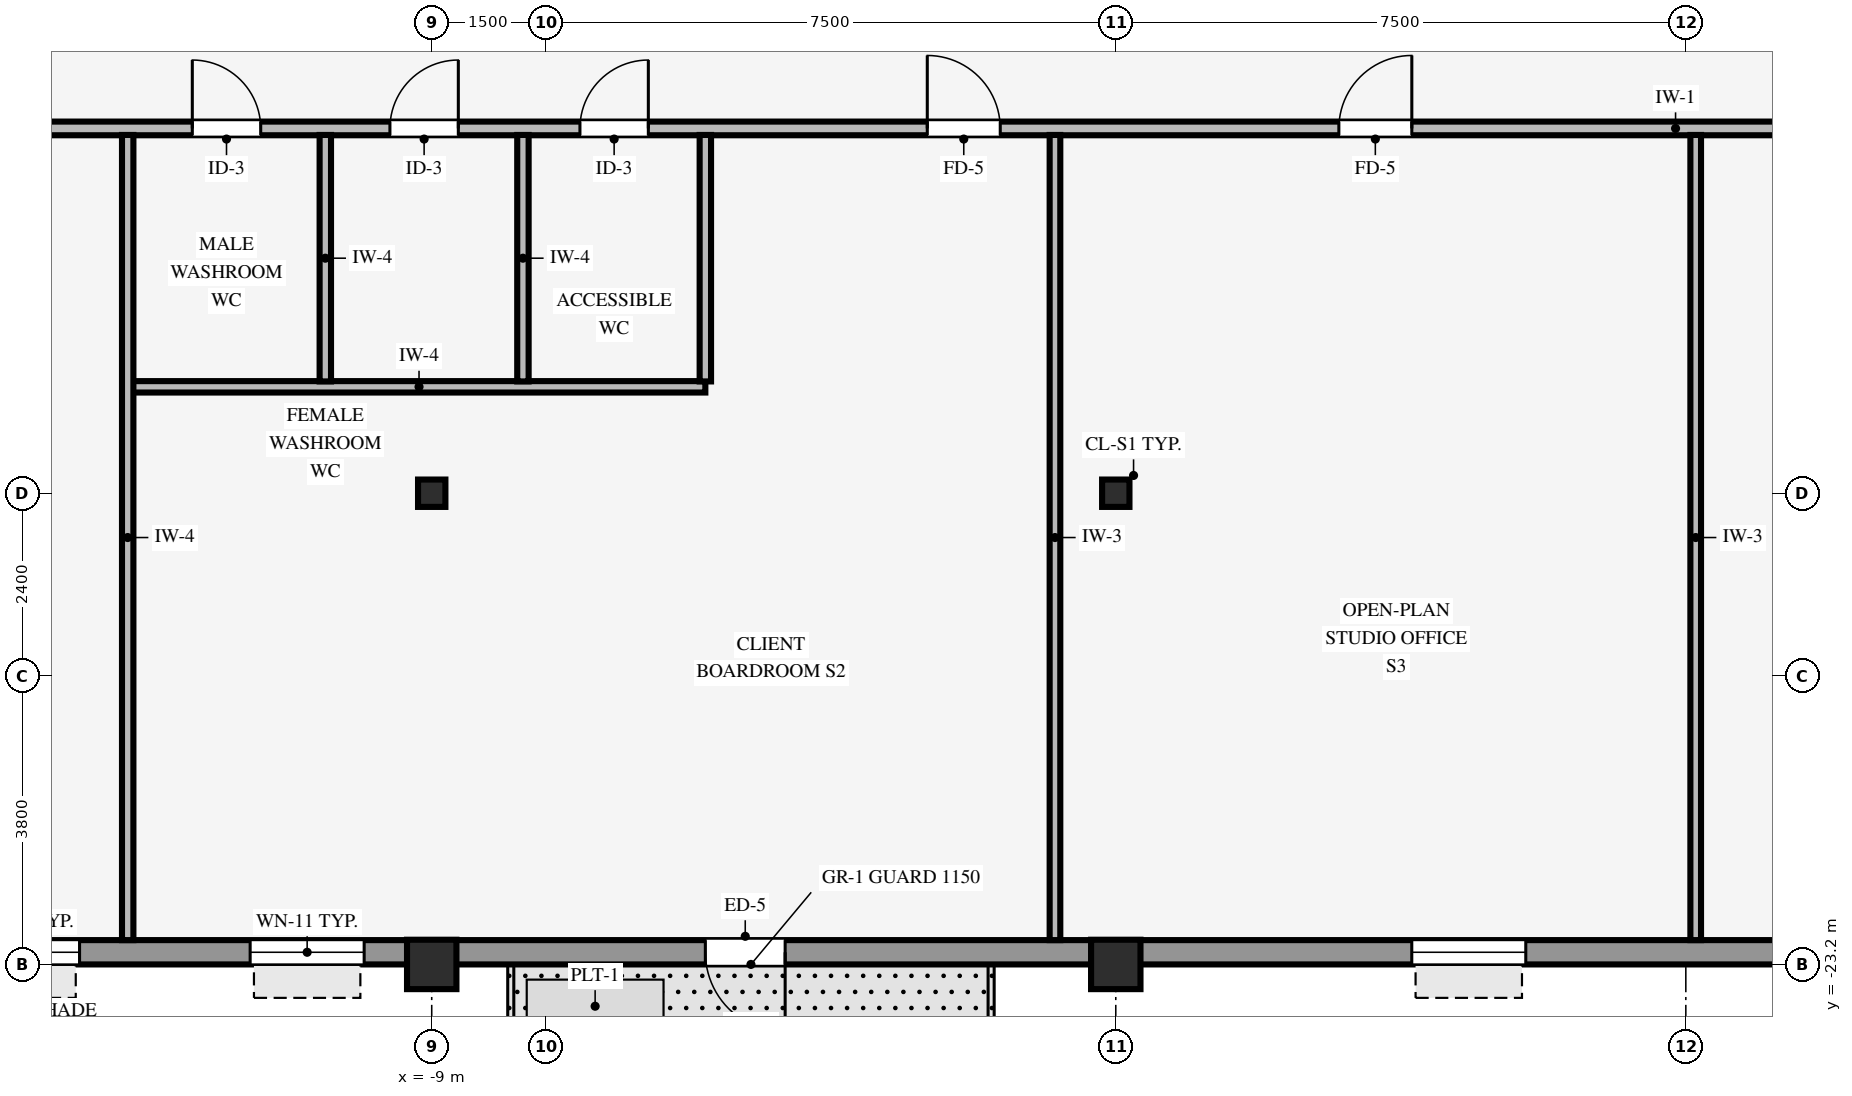
"""IFC4 building model, lengths in metres.
Left out: names, types, materials, properties, quantities, classifications, styles, units other than length and angle.
Written with IfcOpenShell. Run it as: python <this file> out.ifc"""

import sys

from ifc_helpers import new_model, si_unit, direction, frame, frame_2d, origin, origin_2d, place, context, subcontext, project, spatial, rectangle, hollow_rectangle, i_section, extrude, source, transform, mapped, element, fill, save


model = new_model("IFC4")
c1 = context("Model", 3, precision=1e-05, world=origin(), true_north=direction((0.0, 1.0)))
c2 = subcontext(c1, "Body", "Model", "MODEL_VIEW")
j1 = project(units=[si_unit("LENGTHUNIT", "METRE"), si_unit("PLANEANGLEUNIT", "RADIAN")], contexts=[c1])
p1 = place(None, origin())
s1 = spatial("IfcSite", under=j1, at=p1, CompositionType="ELEMENT")
p2 = place(p1, origin())
s2 = spatial("IfcBuilding", under=s1, at=p2, CompositionType="ELEMENT")
p3 = place(p2, frame((0.0, 0.0, 112.9)))
s3 = spatial("IfcBuildingStorey", under=s2, at=p3, CompositionType="ELEMENT", Elevation=112.9)
for number, where, z_axis, x_axis in (
    (1, (-9.0, -23.2, 0.0), (0.0, 0.0, 1.0), (1.0, 0.0, 0.0)),
    (2, (0.0, -23.2, 0.0), (0.0, 0.0, 1.0), (1.0, 0.0, 0.0)),
):
    element("IfcColumn", number, at=place(p3, frame(where, z_axis=z_axis, x_axis=x_axis)), inside=s3, PredefinedType="COLUMN", context=c2, shape_type="SweptSolid", body=[
        extrude(hollow_rectangle(XDim=0.65, YDim=0.65, WallThickness=0.04, InnerFilletRadius=0.04, OuterFilletRadius=0.08, at=origin_2d()), origin(), (0.0, 0.0, 1.0), 3.25),
    ])
for number, where, z_axis, x_axis in (
    (3, (0.0, -17.0, 0.0), (0.0, 0.0, 1.0), (1.0, 0.0, 0.0)),
    (4, (-9.0, -17.0, 0.0), (0.0, 0.0, 1.0), (1.0, 0.0, 0.0)),
):
    element("IfcColumn", number, at=place(p3, frame(where, z_axis=z_axis, x_axis=x_axis)), inside=s3, PredefinedType="COLUMN", context=c2, shape_type="SweptSolid", body=[
        extrude(i_section(OverallWidth=0.36, OverallDepth=0.36, WebThickness=0.021, FlangeThickness=0.021, FilletRadius=0.018, at=origin_2d()), origin(), (0.0, 0.0, 1.0), 3.25),
    ])
p4 = place(p3, frame((-21.9, -23.04, 0.0), z_axis=(0.0, 0.0, 1.0), x_axis=(1.0, 0.0, 0.0)))
e5 = element("IfcWall", 5, at=p4, inside=s3, PredefinedType="STANDARD", context=c2, shape_type="SweptSolid", body=[
    extrude(rectangle(XDim=43.8, YDim=0.32, at=frame_2d((21.9, 0.0))), origin(), (0.0, 0.0, 1.0), 2.585),
])
p5 = place(p4, frame((17.55, 0.0, 0.0), z_axis=(0.0, 0.0, 1.0), x_axis=(-1.0, 0.0, 0.0)))
e6 = element("IfcOpeningElement", 6, at=p5, cuts=e5, PredefinedType="OPENING", context=c2, shape_type="SweptSolid", body=[
    extrude(rectangle(XDim=1.05, YDim=2.1, at=frame_2d((0.525, 1.05))), frame((0.0, 0.17, 0.0), z_axis=(0.0, -1.0, 0.0), x_axis=(1.0, 0.0, 0.0)), (0.0, 0.0, 1.0), 0.34),
])
p6 = place(p4, frame((2.572, 0.0, 0.8)))
e7 = element("IfcOpeningElement", 7, at=p6, cuts=e5, PredefinedType="OPENING", context=c2, shape_type="SweptSolid", body=[
    extrude(rectangle(XDim=1.5, YDim=1.6, at=frame_2d((0.75, 0.8))), frame((0.0, 0.17, 0.0), z_axis=(0.0, -1.0, 0.0), x_axis=(1.0, 0.0, 0.0)), (0.0, 0.0, 1.0), 0.34),
])
p7 = place(p4, frame((6.767, 0.0, 0.8)))
e8 = element("IfcOpeningElement", 8, at=p7, cuts=e5, PredefinedType="OPENING", context=c2, shape_type="SweptSolid", body=[
    extrude(rectangle(XDim=1.5, YDim=1.6, at=frame_2d((0.75, 0.8))), frame((0.0, 0.17, 0.0), z_axis=(0.0, -1.0, 0.0), x_axis=(1.0, 0.0, 0.0)), (0.0, 0.0, 1.0), 0.34),
])
p8 = place(p4, frame((10.511, 0.0, 0.8)))
e9 = element("IfcOpeningElement", 9, at=p8, cuts=e5, PredefinedType="OPENING", context=c2, shape_type="SweptSolid", body=[
    extrude(rectangle(XDim=1.5, YDim=1.6, at=frame_2d((0.75, 0.8))), frame((0.0, 0.17, 0.0), z_axis=(0.0, -1.0, 0.0), x_axis=(1.0, 0.0, 0.0)), (0.0, 0.0, 1.0), 0.34),
])
p9 = place(p4, frame((25.794, 0.0, 0.8)))
e10 = element("IfcOpeningElement", 10, at=p9, cuts=e5, PredefinedType="OPENING", context=c2, shape_type="SweptSolid", body=[
    extrude(rectangle(XDim=1.5, YDim=1.6, at=frame_2d((0.75, 0.8))), frame((0.0, 0.17, 0.0), z_axis=(0.0, -1.0, 0.0), x_axis=(1.0, 0.0, 0.0)), (0.0, 0.0, 1.0), 0.34),
])
p10 = place(p4, frame((31.789, 0.0, 0.8)))
e11 = element("IfcOpeningElement", 11, at=p10, cuts=e5, PredefinedType="OPENING", context=c2, shape_type="SweptSolid", body=[
    extrude(rectangle(XDim=1.5, YDim=1.6, at=frame_2d((0.75, 0.8))), frame((0.0, 0.17, 0.0), z_axis=(0.0, -1.0, 0.0), x_axis=(1.0, 0.0, 0.0)), (0.0, 0.0, 1.0), 0.34),
])
p11 = place(p4, frame((35.083, 0.0, 0.8)))
e12 = element("IfcOpeningElement", 12, at=p11, cuts=e5, PredefinedType="OPENING", context=c2, shape_type="SweptSolid", body=[
    extrude(rectangle(XDim=1.5, YDim=1.6, at=frame_2d((0.75, 0.8))), frame((0.0, 0.17, 0.0), z_axis=(0.0, -1.0, 0.0), x_axis=(1.0, 0.0, 0.0)), (0.0, 0.0, 1.0), 0.34),
])
p12 = place(p4, frame((39.728, 0.0, 0.8)))
e13 = element("IfcOpeningElement", 13, at=p12, cuts=e5, PredefinedType="OPENING", context=c2, shape_type="SweptSolid", body=[
    extrude(rectangle(XDim=1.5, YDim=1.6, at=frame_2d((0.75, 0.8))), frame((0.0, 0.17, 0.0), z_axis=(0.0, -1.0, 0.0), x_axis=(1.0, 0.0, 0.0)), (0.0, 0.0, 1.0), 0.34),
])
p13 = place(p3, frame((-12.934, -15.6, 0.0), z_axis=(0.0, 0.0, 1.0), x_axis=(1.0, 0.0, 0.0)))
e14 = element("IfcWall", 14, at=p13, inside=s3, PredefinedType="PARTITIONING", context=c2, shape_type="SweptSolid", body=[
    extrude(rectangle(XDim=7.534, YDim=0.15, at=frame_2d((3.767, 0.0))), origin(), (0.0, 0.0, 1.0), 3.24),
])
p14 = place(p3, frame((-15.0, -12.2, 0.0), z_axis=(0.0, 0.0, 1.0), x_axis=(1.0, 0.0, 0.0)))
e15 = element("IfcWall", 15, at=p14, inside=s3, PredefinedType="PARTITIONING", context=c2, shape_type="SweptSolid", body=[
    extrude(rectangle(XDim=30.0, YDim=0.18, at=frame_2d((15.0, 0.0))), origin(), (0.0, 0.0, 1.0), 3.24),
])
p15 = place(p14, frame((17.935, 0.0, 0.0)))
e16 = element("IfcOpeningElement", 16, at=p15, cuts=e15, PredefinedType="OPENING", context=c2, shape_type="SweptSolid", body=[
    extrude(rectangle(XDim=0.96, YDim=2.1, at=frame_2d((0.48, 1.05))), frame((0.0, 0.1, 0.0), z_axis=(0.0, -1.0, 0.0), x_axis=(1.0, 0.0, 0.0)), (0.0, 0.0, 1.0), 0.2),
])
p16 = place(p14, frame((25.835, 0.0, 0.0)))
e17 = element("IfcOpeningElement", 17, at=p16, cuts=e15, PredefinedType="OPENING", context=c2, shape_type="SweptSolid", body=[
    extrude(rectangle(XDim=0.96, YDim=2.1, at=frame_2d((0.48, 1.05))), frame((0.0, 0.1, 0.0), z_axis=(0.0, -1.0, 0.0), x_axis=(1.0, 0.0, 0.0)), (0.0, 0.0, 1.0), 0.2),
])
p17 = place(p14, frame((5.45, 0.0, 0.0)))
e18 = element("IfcOpeningElement", 18, at=p17, cuts=e15, PredefinedType="OPENING", context=c2, shape_type="SweptSolid", body=[
    extrude(rectangle(XDim=0.9, YDim=2.1, at=frame_2d((0.45, 1.05))), frame((0.0, 0.1, 0.0), z_axis=(0.0, -1.0, 0.0), x_axis=(1.0, 0.0, 0.0)), (0.0, 0.0, 1.0), 0.2),
])
p18 = place(p14, frame((2.85, 0.0, 0.0)))
e19 = element("IfcOpeningElement", 19, at=p18, cuts=e15, PredefinedType="OPENING", context=c2, shape_type="SweptSolid", body=[
    extrude(rectangle(XDim=0.9, YDim=2.1, at=frame_2d((0.45, 1.05))), frame((0.0, 0.1, 0.0), z_axis=(0.0, -1.0, 0.0), x_axis=(1.0, 0.0, 0.0)), (0.0, 0.0, 1.0), 0.2),
])
p19 = place(p14, frame((12.52, 0.0, 0.0)))
e20 = element("IfcOpeningElement", 20, at=p19, cuts=e15, PredefinedType="OPENING", context=c2, shape_type="SweptSolid", body=[
    extrude(rectangle(XDim=0.96, YDim=2.1, at=frame_2d((0.48, 1.05))), frame((0.0, 0.1, 0.0), z_axis=(0.0, -1.0, 0.0), x_axis=(1.0, 0.0, 0.0)), (0.0, 0.0, 1.0), 0.2),
])
p20 = place(p14, frame((7.95, 0.0, 0.0)))
e21 = element("IfcOpeningElement", 21, at=p20, cuts=e15, PredefinedType="OPENING", context=c2, shape_type="SweptSolid", body=[
    extrude(rectangle(XDim=0.9, YDim=2.1, at=frame_2d((0.45, 1.05))), frame((0.0, 0.1, 0.0), z_axis=(0.0, -1.0, 0.0), x_axis=(1.0, 0.0, 0.0)), (0.0, 0.0, 1.0), 0.2),
])
p21 = place(p3, frame((-13.0, -22.88, 0.0), z_axis=(0.0, 0.0, 1.0), x_axis=(0.0, 1.0, 0.0)))
e22 = element("IfcWall", 22, at=p21, inside=s3, PredefinedType="PARTITIONING", context=c2, shape_type="SweptSolid", body=[
    extrude(rectangle(XDim=10.594, YDim=0.15, at=frame_2d((5.297, 0.0))), origin(), (0.0, 0.0, 1.0), 3.24),
])
for number, where, z_axis, x_axis in (
    (23, (-10.4, -15.529, 0.0), (0.0, 0.0, 1.0), (0.0, 1.0, 0.0)),
    (24, (-7.8, -15.529, 0.0), (0.0, 0.0, 1.0), (0.0, 1.0, 0.0)),
    (25, (-5.4, -15.529, 0.0), (0.0, 0.0, 1.0), (0.0, 1.0, 0.0)),
):
    element("IfcWall", number, at=place(p3, frame(where, z_axis=z_axis, x_axis=x_axis)), inside=s3, PredefinedType="PARTITIONING", context=c2, shape_type="SweptSolid", body=[
        extrude(rectangle(XDim=3.243, YDim=0.15, at=frame_2d((1.622, 0.0))), origin(), (0.0, 0.0, 1.0), 3.24),
    ])
for number, where, z_axis, x_axis in (
    (26, (-0.8, -22.88, 0.0), (0.0, 0.0, 1.0), (0.0, 1.0, 0.0)),
    (27, (7.63, -22.88, 0.0), (0.0, 0.0, 1.0), (0.0, 1.0, 0.0)),
):
    element("IfcWall", number, at=place(p3, frame(where, z_axis=z_axis, x_axis=x_axis)), inside=s3, PredefinedType="PARTITIONING", context=c2, shape_type="SweptSolid", body=[
        extrude(rectangle(XDim=10.594, YDim=0.14, at=frame_2d((5.297, 0.0))), origin(), (0.0, 0.0, 1.0), 3.24),
    ])
m1 = source(origin(), c2, "Body", "SweptSolid", [
    extrude(rectangle(XDim=1.05, YDim=2.1, at=frame_2d((0.525, 1.05))), frame((0.0, 0.025, 0.0), z_axis=(0.0, -1.0, 0.0), x_axis=(1.0, 0.0, 0.0)), (0.0, 0.0, 1.0), 0.05),
])
p22 = place(p5, origin())
e28 = element("IfcDoor", 28, at=p22, inside=s3, OperationType="SINGLE_SWING_LEFT", PredefinedType="DOOR", context=c2, shape_type="MappedRepresentation", body=[
    mapped(m1, transform((0.0, 0.0, 0.0), scale=1.0)),
])
fill(e6, e28)
m2 = source(origin(), c2, "Body", "SweptSolid", [
    extrude(rectangle(XDim=1.5, YDim=1.6, at=frame_2d((0.75, 0.8))), frame((0.0, 0.03, 0.0), z_axis=(0.0, -1.0, 0.0), x_axis=(1.0, 0.0, 0.0)), (0.0, 0.0, 1.0), 0.06),
])
p23 = place(p7, origin())
e29 = element("IfcWindow", 29, at=p23, inside=s3, PartitioningType="SINGLE_PANEL", PredefinedType="WINDOW", context=c2, shape_type="MappedRepresentation", body=[
    mapped(m2, transform((0.0, 0.0, 0.0), scale=1.0)),
])
fill(e8, e29)
p24 = place(p8, origin())
e30 = element("IfcWindow", 30, at=p24, inside=s3, PartitioningType="SINGLE_PANEL", PredefinedType="WINDOW", context=c2, shape_type="MappedRepresentation", body=[
    mapped(m2, transform((0.0, 0.0, 0.0), scale=1.0)),
])
fill(e9, e30)
p25 = place(p9, origin())
e31 = element("IfcWindow", 31, at=p25, inside=s3, PartitioningType="SINGLE_PANEL", PredefinedType="WINDOW", context=c2, shape_type="MappedRepresentation", body=[
    mapped(m2, transform((0.0, 0.0, 0.0), scale=1.0)),
])
fill(e10, e31)
m3 = source(origin(), c2, "Body", "SweptSolid", [
    extrude(rectangle(XDim=0.96, YDim=2.1, at=frame_2d((0.48, 1.05))), frame((0.0, 0.025, 0.0), z_axis=(0.0, -1.0, 0.0), x_axis=(1.0, 0.0, 0.0)), (0.0, 0.0, 1.0), 0.05),
])
p26 = place(p15, origin())
e32 = element("IfcDoor", 32, at=p26, inside=s3, OperationType="SINGLE_SWING_RIGHT", PredefinedType="DOOR", context=c2, shape_type="MappedRepresentation", body=[
    mapped(m3, transform((0.0, 0.0, 0.0), scale=1.0)),
])
fill(e16, e32)
m4 = source(origin(), c2, "Body", "SweptSolid", [
    extrude(rectangle(XDim=0.9, YDim=2.1, at=frame_2d((0.45, 1.05))), frame((0.0, 0.025, 0.0), z_axis=(0.0, -1.0, 0.0), x_axis=(1.0, 0.0, 0.0)), (0.0, 0.0, 1.0), 0.05),
])
p27 = place(p17, origin())
e33 = element("IfcDoor", 33, at=p27, inside=s3, OperationType="SINGLE_SWING_RIGHT", PredefinedType="DOOR", context=c2, shape_type="MappedRepresentation", body=[
    mapped(m4, transform((0.0, 0.0, 0.0), scale=1.0)),
])
fill(e18, e33)
p28 = place(p18, origin())
e34 = element("IfcDoor", 34, at=p28, inside=s3, OperationType="SINGLE_SWING_LEFT", PredefinedType="DOOR", context=c2, shape_type="MappedRepresentation", body=[
    mapped(m4, transform((0.0, 0.0, 0.0), scale=1.0)),
])
fill(e19, e34)
p29 = place(p19, origin())
e35 = element("IfcDoor", 35, at=p29, inside=s3, OperationType="SINGLE_SWING_LEFT", PredefinedType="DOOR", context=c2, shape_type="MappedRepresentation", body=[
    mapped(m3, transform((0.0, 0.0, 0.0), scale=1.0)),
])
fill(e20, e35)
p30 = place(p20, origin())
e36 = element("IfcDoor", 36, at=p30, inside=s3, OperationType="SINGLE_SWING_RIGHT", PredefinedType="DOOR", context=c2, shape_type="MappedRepresentation", body=[
    mapped(m4, transform((0.0, 0.0, 0.0), scale=1.0)),
])
fill(e21, e36)
save(model, sys.argv[1])
